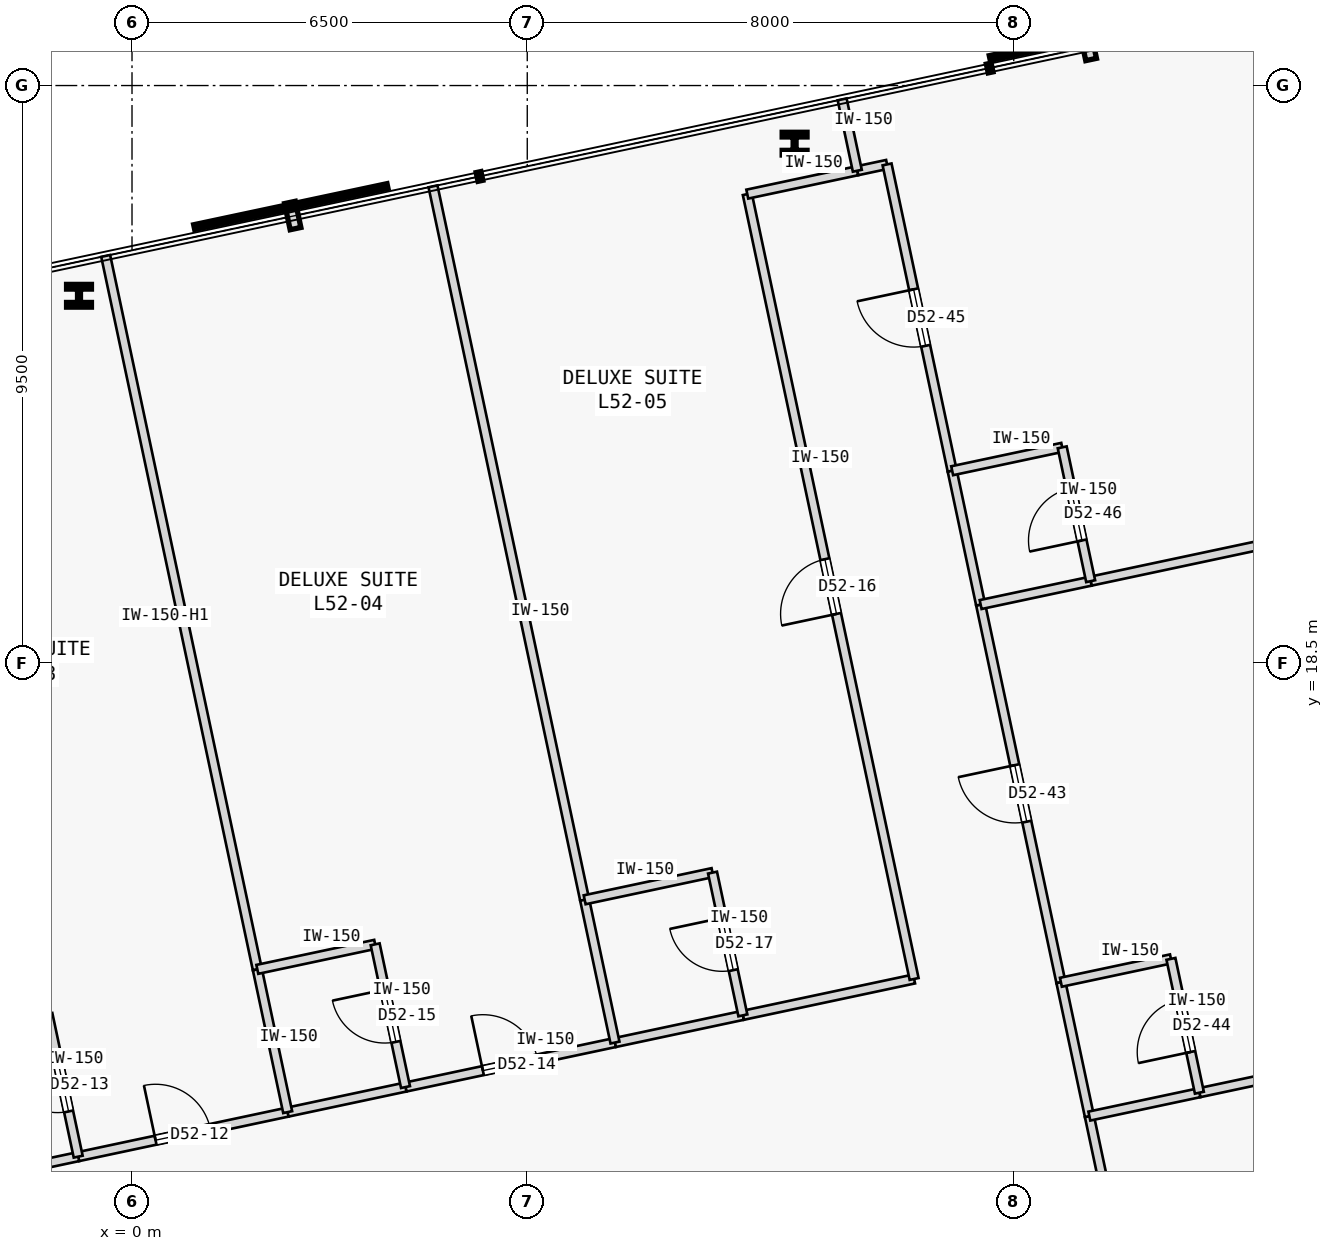
"""IFC4 building model, lengths in metres.
Left out: names, types, materials, properties, quantities, classifications, styles, units other than length and angle.
Written with IfcOpenShell. Run it as: python <this file> out.ifc"""

import sys

from ifc_helpers import new_model, si_unit, direction, frame, frame_2d, origin, origin_2d, place, context, subcontext, project, spatial, rectangle, i_section, extrude, element, fill, save


model = new_model("IFC4")
c1 = context("Model", 3, precision=1e-05, world=origin(), true_north=direction((0.0, 1.0)))
c2 = subcontext(c1, "Body", "Model", "MODEL_VIEW")
j1 = project(units=[si_unit("LENGTHUNIT", "METRE"), si_unit("PLANEANGLEUNIT", "RADIAN")], contexts=[c1])
p1 = place(None, origin())
s1 = spatial("IfcSite", under=j1, at=p1, CompositionType="ELEMENT")
p2 = place(p1, origin())
s2 = spatial("IfcBuilding", under=s1, at=p2, CompositionType="ELEMENT")
p3 = place(p2, frame((0.0, 0.0, 199.0)))
s3 = spatial("IfcBuildingStorey", under=s2, at=p3, CompositionType="ELEMENT", Elevation=199.0)
for number, where, z_axis, x_axis in (
    (1, (10.896, 27.044, 0.0), (0.0, 0.0, 1.0), (1.0, 0.0, 0.0)),
    (2, (-0.872, 24.543, 0.0), (0.0, 0.0, 1.0), (1.0, 0.0, 0.0)),
):
    element("IfcColumn", number, at=place(p3, frame(where, z_axis=z_axis, x_axis=x_axis)), inside=s3, PredefinedType="COLUMN", context=c2, shape_type="SweptSolid", body=[
        extrude(i_section(OverallWidth=0.409, OverallDepth=0.374, WebThickness=0.048, FlangeThickness=0.077, FilletRadius=0.015, at=origin_2d()), origin(), (0.0, 0.0, 1.0), 3.4),
    ])
p4 = place(p3, frame((-0.885, 10.386, 0.0), z_axis=(0.0, 0.0, 1.0), x_axis=(0.978153036861, 0.207886114205, 0.0)))
e3 = element("IfcWall", 3, at=p4, inside=s3, PredefinedType="PARTITIONING", context=c2, shape_type="SweptSolid", body=[
    extrude(rectangle(XDim=3.522, YDim=0.15, at=frame_2d((1.761, 0.0))), origin(), (0.0, 0.0, 1.0), 3.0),
])
p5 = place(p4, frame((1.301, 0.0, 0.0)))
e4 = element("IfcOpeningElement", 4, at=p5, cuts=e3, PredefinedType="OPENING", context=c2, shape_type="SweptSolid", body=[
    extrude(rectangle(XDim=0.92, YDim=2.15, at=frame_2d((0.46, 1.075))), frame((0.0, 0.085, 0.0), z_axis=(0.0, -1.0, 0.0), x_axis=(1.0, 0.0, 0.0)), (0.0, 0.0, 1.0), 0.17),
])
p6 = place(p3, frame((-2.823, 9.974, 0.0), z_axis=(0.0, 0.0, 1.0), x_axis=(0.978149140323, 0.20790444749, 0.0)))
e5 = element("IfcWall", 5, at=p6, inside=s3, PredefinedType="PARTITIONING", context=c2, shape_type="SweptSolid", body=[
    extrude(rectangle(XDim=1.981, YDim=0.15, at=frame_2d((0.99, 0.0))), origin(), (0.0, 0.0, 1.0), 3.0),
])
p7 = place(p3, frame((4.498, 11.53, 0.0), z_axis=(0.0, 0.0, 1.0), x_axis=(0.978135941404, 0.207966536089, 0.0)))
e6 = element("IfcWall", 6, at=p7, inside=s3, PredefinedType="PARTITIONING", context=c2, shape_type="SweptSolid", body=[
    extrude(rectangle(XDim=3.522, YDim=0.15, at=frame_2d((1.761, 0.0))), origin(), (0.0, 0.0, 1.0), 3.0),
])
p8 = place(p7, frame((1.301, 0.0, 0.0)))
e7 = element("IfcOpeningElement", 7, at=p8, cuts=e6, PredefinedType="OPENING", context=c2, shape_type="SweptSolid", body=[
    extrude(rectangle(XDim=0.92, YDim=2.15, at=frame_2d((0.46, 1.075))), frame((0.0, 0.085, 0.0), z_axis=(0.0, -1.0, 0.0), x_axis=(1.0, 0.0, 0.0)), (0.0, 0.0, 1.0), 0.17),
])
p9 = place(p3, frame((2.56, 11.118, 0.0), z_axis=(0.0, 0.0, 1.0), x_axis=(0.978149140323, 0.20790444749, 0.0)))
e8 = element("IfcWall", 8, at=p9, inside=s3, PredefinedType="PARTITIONING", context=c2, shape_type="SweptSolid", body=[
    extrude(rectangle(XDim=1.981, YDim=0.15, at=frame_2d((0.99, 0.0))), origin(), (0.0, 0.0, 1.0), 3.0),
])
p10 = place(p3, frame((10.046, 12.709, 0.0), z_axis=(0.0, 0.0, 1.0), x_axis=(0.97816208355, 0.207843542851, 0.0)))
e9 = element("IfcWall", 9, at=p10, inside=s3, PredefinedType="PARTITIONING", context=c2, shape_type="SweptSolid", body=[
    extrude(rectangle(XDim=2.879, YDim=0.15, at=frame_2d((1.439, 0.0))), origin(), (0.0, 0.0, 1.0), 3.0),
])
p11 = place(p3, frame((12.862, 13.308, 0.0), z_axis=(0.0, 0.0, 1.0), x_axis=(-0.207911421929, 0.978147657888, 0.0)))
e10 = element("IfcWall", 10, at=p11, inside=s3, PredefinedType="PARTITIONING", context=c2, shape_type="SweptSolid", body=[
    extrude(rectangle(XDim=13.195, YDim=0.15, at=frame_2d((6.598, 0.0))), origin(), (0.0, 0.0, 1.0), 3.0),
])
p12 = place(p11, frame((6.137, 0.0, 0.0)))
e11 = element("IfcOpeningElement", 11, at=p12, cuts=e10, PredefinedType="OPENING", context=c2, shape_type="SweptSolid", body=[
    extrude(rectangle(XDim=0.92, YDim=2.15, at=frame_2d((0.46, 1.075))), frame((0.0, 0.085, 0.0), z_axis=(0.0, -1.0, 0.0), x_axis=(1.0, 0.0, 0.0)), (0.0, 0.0, 1.0), 0.17),
])
p13 = place(p3, frame((10.118, 26.214, 0.0), z_axis=(0.0, 0.0, 1.0), x_axis=(0.978133353907, 0.20797870558, 0.0)))
e12 = element("IfcWall", 12, at=p13, inside=s3, PredefinedType="PARTITIONING", context=c2, shape_type="SweptSolid", body=[
    extrude(rectangle(XDim=1.85, YDim=0.15, at=frame_2d((0.925, 0.0))), origin(), (0.0, 0.0, 1.0), 3.0),
])
p14 = place(p3, frame((7.943, 12.262, 0.0), z_axis=(0.0, 0.0, 1.0), x_axis=(0.978146728319, 0.207915795165, 0.0)))
e13 = element("IfcWall", 13, at=p14, inside=s3, PredefinedType="PARTITIONING", context=c2, shape_type="SweptSolid", body=[
    extrude(rectangle(XDim=2.15, YDim=0.15, at=frame_2d((1.075, 0.0))), origin(), (0.0, 0.0, 1.0), 3.0),
])
p15 = place(p3, frame((17.064, 4.841, 0.0), z_axis=(0.0, 0.0, 1.0), x_axis=(-0.207924511115, 0.978144875608, 0.0)))
e14 = element("IfcWall", 14, at=p15, inside=s3, PredefinedType="PARTITIONING", context=c2, shape_type="SweptSolid", body=[
    extrude(rectangle(XDim=6.35, YDim=0.15, at=frame_2d((3.175, 0.0))), origin(), (0.0, 0.0, 1.0), 3.0),
])
p16 = place(p15, frame((2.7, 0.0, 0.0)))
e15 = element("IfcOpeningElement", 15, at=p16, cuts=e14, PredefinedType="OPENING", context=c2, shape_type="SweptSolid", body=[
    extrude(rectangle(XDim=0.95, YDim=2.15, at=frame_2d((0.475, 1.075))), frame((0.0, 0.085, 0.0), z_axis=(0.0, -1.0, 0.0), x_axis=(1.0, 0.0, 0.0)), (0.0, 0.0, 1.0), 0.17),
])
p17 = place(p3, frame((15.276, 13.253, 0.0), z_axis=(0.0, 0.0, 1.0), x_axis=(-0.207924511115, 0.978144875608, 0.0)))
e16 = element("IfcWall", 16, at=p17, inside=s3, PredefinedType="PARTITIONING", context=c2, shape_type="SweptSolid", body=[
    extrude(rectangle(XDim=6.35, YDim=0.15, at=frame_2d((3.175, 0.0))), origin(), (0.0, 0.0, 1.0), 3.0),
])
p18 = place(p17, frame((2.7, 0.0, 0.0)))
e17 = element("IfcOpeningElement", 17, at=p18, cuts=e16, PredefinedType="OPENING", context=c2, shape_type="SweptSolid", body=[
    extrude(rectangle(XDim=0.95, YDim=2.15, at=frame_2d((0.475, 1.075))), frame((0.0, 0.085, 0.0), z_axis=(0.0, -1.0, 0.0), x_axis=(1.0, 0.0, 0.0)), (0.0, 0.0, 1.0), 0.17),
])
p19 = place(p3, frame((15.744, 11.052, 0.0), z_axis=(0.0, 0.0, 1.0), x_axis=(-0.207891197838, 0.978151956427, 0.0)))
e18 = element("IfcWall", 18, at=p19, inside=s3, PredefinedType="PARTITIONING", context=c2, shape_type="SweptSolid", body=[
    extrude(rectangle(XDim=2.25, YDim=0.15, at=frame_2d((1.125, 0.0))), origin(), (0.0, 0.0, 1.0), 3.0),
])
p20 = place(p3, frame((11.928, 26.599, 0.0), z_axis=(0.0, 0.0, 1.0), x_axis=(0.97822210712, 0.207560856478, 0.0)))
e19 = element("IfcWall", 19, at=p20, inside=s3, PredefinedType="PARTITIONING", context=c2, shape_type="SweptSolid", body=[
    extrude(rectangle(XDim=0.5, YDim=0.15, at=frame_2d((0.25, 0.0))), origin(), (0.0, 0.0, 1.0), 3.0),
])
p21 = place(p3, frame((13.488, 21.666, 0.0), z_axis=(0.0, 0.0, 1.0), x_axis=(-0.207926226209, 0.978144511028, 0.0)))
e20 = element("IfcWall", 20, at=p21, inside=s3, PredefinedType="PARTITIONING", context=c2, shape_type="SweptSolid", body=[
    extrude(rectangle(XDim=5.15, YDim=0.15, at=frame_2d((2.575, 0.0))), origin(), (0.0, 0.0, 1.0), 3.0),
])
p22 = place(p21, frame((2.1, 0.0, 0.0)))
e21 = element("IfcOpeningElement", 21, at=p22, cuts=e20, PredefinedType="OPENING", context=c2, shape_type="SweptSolid", body=[
    extrude(rectangle(XDim=0.95, YDim=2.15, at=frame_2d((0.475, 1.075))), frame((0.0, 0.085, 0.0), z_axis=(0.0, -1.0, 0.0), x_axis=(1.0, 0.0, 0.0)), (0.0, 0.0, 1.0), 0.17),
])
p23 = place(p3, frame((13.956, 19.465, 0.0), z_axis=(0.0, 0.0, 1.0), x_axis=(-0.207891197838, 0.978151956427, 0.0)))
e22 = element("IfcWall", 22, at=p23, inside=s3, PredefinedType="PARTITIONING", context=c2, shape_type="SweptSolid", body=[
    extrude(rectangle(XDim=2.25, YDim=0.15, at=frame_2d((1.125, 0.0))), origin(), (0.0, 0.0, 1.0), 3.0),
])
p24 = place(p3, frame((-0.885, 10.386, 0.0), z_axis=(0.0, 0.0, 1.0), x_axis=(-0.207917150959, 0.978146440129, 0.0)))
e23 = element("IfcWall", 23, at=p24, inside=s3, PredefinedType="PARTITIONING", context=c2, shape_type="SweptSolid", body=[
    extrude(rectangle(XDim=2.4, YDim=0.15, at=frame_2d((1.2, 0.0))), origin(), (0.0, 0.0, 1.0), 3.0),
])
p25 = place(p24, frame((0.76, 0.0, 0.0)))
e24 = element("IfcOpeningElement", 24, at=p25, cuts=e23, PredefinedType="OPENING", context=c2, shape_type="SweptSolid", body=[
    extrude(rectangle(XDim=0.88, YDim=2.15, at=frame_2d((0.44, 1.075))), frame((0.0, 0.085, 0.0), z_axis=(0.0, -1.0, 0.0), x_axis=(1.0, 0.0, 0.0)), (0.0, 0.0, 1.0), 0.17),
])
p26 = place(p3, frame((2.061, 13.466, 0.0), z_axis=(0.0, 0.0, 1.0), x_axis=(-0.207910848762, 0.978147779718, 0.0)))
e25 = element("IfcWall", 25, at=p26, inside=s3, PredefinedType="PARTITIONING", context=c2, shape_type="SweptSolid", body=[
    extrude(rectangle(XDim=11.995, YDim=0.15, at=frame_2d((5.998, 0.0))), origin(), (0.0, 0.0, 1.0), 2.55),
])
p27 = place(p3, frame((2.56, 11.118, 0.0), z_axis=(0.0, 0.0, 1.0), x_axis=(-0.207917150959, 0.978146440129, 0.0)))
e26 = element("IfcWall", 26, at=p27, inside=s3, PredefinedType="PARTITIONING", context=c2, shape_type="SweptSolid", body=[
    extrude(rectangle(XDim=2.4, YDim=0.15, at=frame_2d((1.2, 0.0))), origin(), (0.0, 0.0, 1.0), 3.0),
])
p28 = place(p3, frame((2.061, 13.466, 0.0), z_axis=(0.0, 0.0, 1.0), x_axis=(0.978149140323, 0.20790444749, 0.0)))
e27 = element("IfcWall", 27, at=p28, inside=s3, PredefinedType="PARTITIONING", context=c2, shape_type="SweptSolid", body=[
    extrude(rectangle(XDim=1.981, YDim=0.15, at=frame_2d((0.99, 0.0))), origin(), (0.0, 0.0, 1.0), 3.0),
])
p29 = place(p3, frame((4.498, 11.53, 0.0), z_axis=(0.0, 0.0, 1.0), x_axis=(-0.207917150959, 0.978146440129, 0.0)))
e28 = element("IfcWall", 28, at=p29, inside=s3, PredefinedType="PARTITIONING", context=c2, shape_type="SweptSolid", body=[
    extrude(rectangle(XDim=2.4, YDim=0.15, at=frame_2d((1.2, 0.0))), origin(), (0.0, 0.0, 1.0), 3.0),
])
p30 = place(p29, frame((0.76, 0.0, 0.0)))
e29 = element("IfcOpeningElement", 29, at=p30, cuts=e28, PredefinedType="OPENING", context=c2, shape_type="SweptSolid", body=[
    extrude(rectangle(XDim=0.88, YDim=2.15, at=frame_2d((0.44, 1.075))), frame((0.0, 0.085, 0.0), z_axis=(0.0, -1.0, 0.0), x_axis=(1.0, 0.0, 0.0)), (0.0, 0.0, 1.0), 0.17),
])
p31 = place(p3, frame((7.444, 14.61, 0.0), z_axis=(0.0, 0.0, 1.0), x_axis=(-0.207910848762, 0.978147779718, 0.0)))
e30 = element("IfcWall", 30, at=p31, inside=s3, PredefinedType="PARTITIONING", context=c2, shape_type="SweptSolid", body=[
    extrude(rectangle(XDim=11.995, YDim=0.15, at=frame_2d((5.998, 0.0))), origin(), (0.0, 0.0, 1.0), 3.0),
])
p32 = place(p3, frame((7.943, 12.262, 0.0), z_axis=(0.0, 0.0, 1.0), x_axis=(-0.207937840262, 0.978142042133, 0.0)))
e31 = element("IfcWall", 31, at=p32, inside=s3, PredefinedType="PARTITIONING", context=c2, shape_type="SweptSolid", body=[
    extrude(rectangle(XDim=2.4, YDim=0.15, at=frame_2d((1.2, 0.0))), origin(), (0.0, 0.0, 1.0), 3.0),
])
p33 = place(p3, frame((7.444, 14.61, 0.0), z_axis=(0.0, 0.0, 1.0), x_axis=(0.978151636287, 0.207892704126, 0.0)))
e32 = element("IfcWall", 32, at=p33, inside=s3, PredefinedType="PARTITIONING", context=c2, shape_type="SweptSolid", body=[
    extrude(rectangle(XDim=2.15, YDim=0.15, at=frame_2d((1.075, 0.0))), origin(), (0.0, 0.0, 1.0), 3.0),
])
p34 = place(p3, frame((10.046, 12.709, 0.0), z_axis=(0.0, 0.0, 1.0), x_axis=(-0.207840504985, 0.978162729042, 0.0)))
e33 = element("IfcWall", 33, at=p34, inside=s3, PredefinedType="PARTITIONING", context=c2, shape_type="SweptSolid", body=[
    extrude(rectangle(XDim=2.4, YDim=0.15, at=frame_2d((1.2, 0.0))), origin(), (0.0, 0.0, 1.0), 3.0),
])
p35 = place(p34, frame((0.76, 0.0, 0.0)))
e34 = element("IfcOpeningElement", 34, at=p35, cuts=e33, PredefinedType="OPENING", context=c2, shape_type="SweptSolid", body=[
    extrude(rectangle(XDim=0.88, YDim=2.15, at=frame_2d((0.44, 1.075))), frame((0.0, 0.085, 0.0), z_axis=(0.0, -1.0, 0.0), x_axis=(1.0, 0.0, 0.0)), (0.0, 0.0, 1.0), 0.17),
])
p36 = place(p3, frame((11.928, 26.599, 0.0), z_axis=(0.0, 0.0, 1.0), x_axis=(-0.20795853359, 0.978137642823, 0.0)))
e35 = element("IfcWall", 35, at=p36, inside=s3, PredefinedType="PARTITIONING", context=c2, shape_type="SweptSolid", body=[
    extrude(rectangle(XDim=1.2, YDim=0.15, at=frame_2d((0.6, 0.0))), origin(), (0.0, 0.0, 1.0), 3.0),
])
p37 = place(p3, frame((17.553, 11.437, 0.0), z_axis=(0.0, 0.0, 1.0), x_axis=(0.97814556055, 0.207921288896, 0.0)))
e36 = element("IfcWall", 36, at=p37, inside=s3, PredefinedType="PARTITIONING", context=c2, shape_type="SweptSolid", body=[
    extrude(rectangle(XDim=12.187, YDim=0.15, at=frame_2d((6.094, 0.0))), origin(), (0.0, 0.0, 1.0), 3.0),
])
for number, where, z_axis, x_axis in (
    (37, (15.744, 11.052, 0.0), (0.0, 0.0, 1.0), (0.978, 0.208, 0.0)),
    (38, (15.276, 13.253, 0.0), (0.0, 0.0, 1.0), (0.978, 0.208, 0.0)),
):
    element("IfcWall", number, at=place(p3, frame(where, z_axis=z_axis, x_axis=x_axis)), inside=s3, PredefinedType="PARTITIONING", context=c2, shape_type="SweptSolid", body=[
        extrude(rectangle(XDim=1.85, YDim=0.15, at=frame_2d((0.925, 0.0))), origin(), (0.0, 0.0, 1.0), 3.0),
    ])
p38 = place(p3, frame((17.553, 11.437, 0.0), z_axis=(0.0, 0.0, 1.0), x_axis=(-0.207891197838, 0.978151956427, 0.0)))
e39 = element("IfcWall", 39, at=p38, inside=s3, PredefinedType="PARTITIONING", context=c2, shape_type="SweptSolid", body=[
    extrude(rectangle(XDim=2.25, YDim=0.15, at=frame_2d((1.125, 0.0))), origin(), (0.0, 0.0, 1.0), 3.0),
])
p39 = place(p38, frame((0.685, 0.0, 0.0)))
e40 = element("IfcOpeningElement", 40, at=p39, cuts=e39, PredefinedType="OPENING", context=c2, shape_type="SweptSolid", body=[
    extrude(rectangle(XDim=0.88, YDim=2.15, at=frame_2d((0.44, 1.075))), frame((0.0, 0.085, 0.0), z_axis=(0.0, -1.0, 0.0), x_axis=(1.0, 0.0, 0.0)), (0.0, 0.0, 1.0), 0.17),
])
p40 = place(p3, frame((15.765, 19.849, 0.0), z_axis=(0.0, 0.0, 1.0), x_axis=(0.978149634612, 0.207902121941, 0.0)))
e41 = element("IfcWall", 41, at=p40, inside=s3, PredefinedType="PARTITIONING", context=c2, shape_type="SweptSolid", body=[
    extrude(rectangle(XDim=12.187, YDim=0.15, at=frame_2d((6.094, 0.0))), origin(), (0.0, 0.0, 1.0), 3.0),
])
for number, where, z_axis, x_axis in (
    (42, (13.956, 19.465, 0.0), (0.0, 0.0, 1.0), (0.978, 0.208, 0.0)),
    (43, (13.488, 21.666, 0.0), (0.0, 0.0, 1.0), (0.978, 0.208, 0.0)),
):
    element("IfcWall", number, at=place(p3, frame(where, z_axis=z_axis, x_axis=x_axis)), inside=s3, PredefinedType="PARTITIONING", context=c2, shape_type="SweptSolid", body=[
        extrude(rectangle(XDim=1.85, YDim=0.15, at=frame_2d((0.925, 0.0))), origin(), (0.0, 0.0, 1.0), 3.0),
    ])
p41 = place(p3, frame((15.765, 19.849, 0.0), z_axis=(0.0, 0.0, 1.0), x_axis=(-0.207891197838, 0.978151956427, 0.0)))
e44 = element("IfcWall", 44, at=p41, inside=s3, PredefinedType="PARTITIONING", context=c2, shape_type="SweptSolid", body=[
    extrude(rectangle(XDim=2.25, YDim=0.15, at=frame_2d((1.125, 0.0))), origin(), (0.0, 0.0, 1.0), 3.0),
])
p42 = place(p41, frame((0.685, 0.0, 0.0)))
e45 = element("IfcOpeningElement", 45, at=p42, cuts=e44, PredefinedType="OPENING", context=c2, shape_type="SweptSolid", body=[
    extrude(rectangle(XDim=0.88, YDim=2.15, at=frame_2d((0.44, 1.075))), frame((0.0, 0.085, 0.0), z_axis=(0.0, -1.0, 0.0), x_axis=(1.0, 0.0, 0.0)), (0.0, 0.0, 1.0), 0.17),
])
p43 = place(p5, origin())
e46 = element("IfcDoor", 46, at=p43, inside=s3, OperationType="SINGLE_SWING_LEFT", PredefinedType="DOOR", context=c2, shape_type="SweptSolid", body=[
    extrude(rectangle(XDim=0.92, YDim=2.15, at=frame_2d((0.46, 1.075))), frame((0.0, 0.025, 0.0), z_axis=(0.0, -1.0, 0.0), x_axis=(1.0, 0.0, 0.0)), (0.0, 0.0, 1.0), 0.05),
])
fill(e4, e46)
p44 = place(p25, origin())
e47 = element("IfcDoor", 47, at=p44, inside=s3, OperationType="SINGLE_SWING_RIGHT", PredefinedType="DOOR", context=c2, shape_type="SweptSolid", body=[
    extrude(rectangle(XDim=0.88, YDim=2.15, at=frame_2d((0.44, 1.075))), frame((0.0, 0.025, 0.0), z_axis=(0.0, -1.0, 0.0), x_axis=(1.0, 0.0, 0.0)), (0.0, 0.0, 1.0), 0.05),
])
fill(e24, e47)
p45 = place(p8, origin())
e48 = element("IfcDoor", 48, at=p45, inside=s3, OperationType="SINGLE_SWING_LEFT", PredefinedType="DOOR", context=c2, shape_type="SweptSolid", body=[
    extrude(rectangle(XDim=0.92, YDim=2.15, at=frame_2d((0.46, 1.075))), frame((0.0, 0.025, 0.0), z_axis=(0.0, -1.0, 0.0), x_axis=(1.0, 0.0, 0.0)), (0.0, 0.0, 1.0), 0.05),
])
fill(e7, e48)
p46 = place(p30, origin())
e49 = element("IfcDoor", 49, at=p46, inside=s3, OperationType="SINGLE_SWING_RIGHT", PredefinedType="DOOR", context=c2, shape_type="SweptSolid", body=[
    extrude(rectangle(XDim=0.88, YDim=2.15, at=frame_2d((0.44, 1.075))), frame((0.0, 0.025, 0.0), z_axis=(0.0, -1.0, 0.0), x_axis=(1.0, 0.0, 0.0)), (0.0, 0.0, 1.0), 0.05),
])
fill(e29, e49)
p47 = place(p12, origin())
e50 = element("IfcDoor", 50, at=p47, inside=s3, OperationType="SINGLE_SWING_LEFT", PredefinedType="DOOR", context=c2, shape_type="SweptSolid", body=[
    extrude(rectangle(XDim=0.92, YDim=2.15, at=frame_2d((0.46, 1.075))), frame((0.0, 0.025, 0.0), z_axis=(0.0, -1.0, 0.0), x_axis=(1.0, 0.0, 0.0)), (0.0, 0.0, 1.0), 0.05),
])
fill(e11, e50)
p48 = place(p35, origin())
e51 = element("IfcDoor", 51, at=p48, inside=s3, OperationType="SINGLE_SWING_RIGHT", PredefinedType="DOOR", context=c2, shape_type="SweptSolid", body=[
    extrude(rectangle(XDim=0.88, YDim=2.15, at=frame_2d((0.44, 1.075))), frame((0.0, 0.025, 0.0), z_axis=(0.0, -1.0, 0.0), x_axis=(1.0, 0.0, 0.0)), (0.0, 0.0, 1.0), 0.05),
])
fill(e34, e51)
p49 = place(p18, origin())
e52 = element("IfcDoor", 52, at=p49, inside=s3, OperationType="SINGLE_SWING_RIGHT", PredefinedType="DOOR", context=c2, shape_type="SweptSolid", body=[
    extrude(rectangle(XDim=0.95, YDim=2.15, at=frame_2d((0.475, 1.075))), frame((0.0, 0.025, 0.0), z_axis=(0.0, -1.0, 0.0), x_axis=(1.0, 0.0, 0.0)), (0.0, 0.0, 1.0), 0.05),
])
fill(e17, e52)
p50 = place(p39, origin())
e53 = element("IfcDoor", 53, at=p50, inside=s3, OperationType="SINGLE_SWING_LEFT", PredefinedType="DOOR", context=c2, shape_type="SweptSolid", body=[
    extrude(rectangle(XDim=0.88, YDim=2.15, at=frame_2d((0.44, 1.075))), frame((0.0, 0.025, 0.0), z_axis=(0.0, -1.0, 0.0), x_axis=(1.0, 0.0, 0.0)), (0.0, 0.0, 1.0), 0.05),
])
fill(e40, e53)
p51 = place(p22, origin())
e54 = element("IfcDoor", 54, at=p51, inside=s3, OperationType="SINGLE_SWING_RIGHT", PredefinedType="DOOR", context=c2, shape_type="SweptSolid", body=[
    extrude(rectangle(XDim=0.95, YDim=2.15, at=frame_2d((0.475, 1.075))), frame((0.0, 0.025, 0.0), z_axis=(0.0, -1.0, 0.0), x_axis=(1.0, 0.0, 0.0)), (0.0, 0.0, 1.0), 0.05),
])
fill(e21, e54)
p52 = place(p42, origin())
e55 = element("IfcDoor", 55, at=p52, inside=s3, OperationType="SINGLE_SWING_LEFT", PredefinedType="DOOR", context=c2, shape_type="SweptSolid", body=[
    extrude(rectangle(XDim=0.88, YDim=2.15, at=frame_2d((0.44, 1.075))), frame((0.0, 0.025, 0.0), z_axis=(0.0, -1.0, 0.0), x_axis=(1.0, 0.0, 0.0)), (0.0, 0.0, 1.0), 0.05),
])
fill(e45, e55)
save(model, sys.argv[1])
